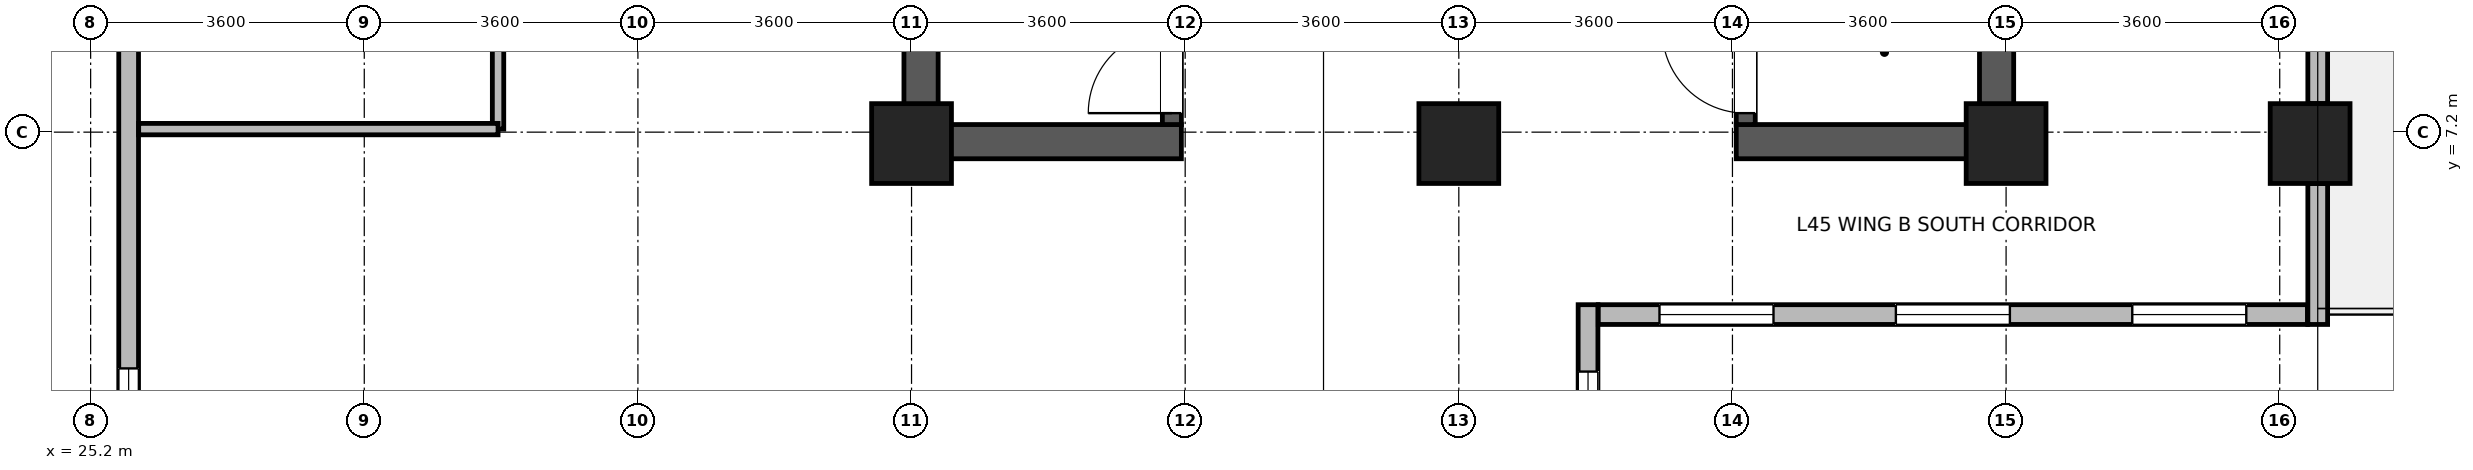
"""IFC4 building model, lengths in metres.
Left out: names, types, materials, properties, quantities, classifications, styles, units other than length and angle.
Written with IfcOpenShell. Run it as: python <this file> out.ifc"""

import sys

from ifc_helpers import new_model, si_unit, direction, frame, frame_2d, origin, origin_2d, place, context, subcontext, project, spatial, rectangle, extrude, source, transform, mapped, element, fill, save


model = new_model("IFC4")
c1 = context("Model", 3, precision=1e-05, world=origin(), true_north=direction((0.0, 1.0)))
c2 = subcontext(c1, "Body", "Model", "MODEL_VIEW")
j1 = project(units=[si_unit("LENGTHUNIT", "METRE"), si_unit("PLANEANGLEUNIT", "RADIAN")], contexts=[c1])
p1 = place(None, origin())
s1 = spatial("IfcSite", under=j1, at=p1, CompositionType="ELEMENT")
p2 = place(p1, origin())
s2 = spatial("IfcBuilding", under=s1, at=p2, CompositionType="ELEMENT")
p3 = place(p2, frame((0.0, 0.0, 177.2)))
s3 = spatial("IfcBuildingStorey", under=s2, at=p3, CompositionType="ELEMENT", Elevation=177.2)
for number, where, z_axis, x_axis in (
    (1, (36.125, 6.85, 0.0), (0.0, 0.0, 1.0), (0.0, 1.0, 0.0)),
    (2, (50.275, 6.85, 0.0), (0.0, 0.0, 1.0), (0.0, 1.0, 0.0)),
):
    element("IfcWall", number, at=place(p3, frame(where, z_axis=z_axis, x_axis=x_axis)), inside=s3, PredefinedType="SHEAR", context=c2, shape_type="SweptSolid", body=[
        extrude(rectangle(XDim=7.9, YDim=0.45, at=frame_2d((3.95, 0.0))), origin(), (0.0, 0.0, 1.0), 3.46),
    ])
for number, where, z_axis, x_axis in (
    (3, (36.35, 7.075, 0.0), (0.0, 0.0, 1.0), (1.0, 0.0, 0.0)),
    (4, (46.85, 7.075, 0.0), (0.0, 0.0, 1.0), (1.0, 0.0, 0.0)),
):
    element("IfcWall", number, at=place(p3, frame(where, z_axis=z_axis, x_axis=x_axis)), inside=s3, PredefinedType="SHEAR", context=c2, shape_type="SweptSolid", body=[
        extrude(rectangle(XDim=3.2, YDim=0.45, at=frame_2d((1.6, 0.0))), origin(), (0.0, 0.0, 1.0), 3.46),
    ])
p4 = place(p3, frame((39.425, 7.3, 0.0), z_axis=(0.0, 0.0, 1.0), x_axis=(0.0, 1.0, 0.0)))
e5 = element("IfcWall", 5, at=p4, inside=s3, PredefinedType="SHEAR", context=c2, shape_type="SweptSolid", body=[
    extrude(rectangle(XDim=7.0, YDim=0.25, at=frame_2d((3.5, 0.0))), origin(), (0.0, 0.0, 1.0), 3.46),
])
p5 = place(p4, frame((0.15, 0.0, 0.0)))
e6 = element("IfcOpeningElement", 6, at=p5, cuts=e5, PredefinedType="OPENING", context=c2, shape_type="SweptSolid", body=[
    extrude(rectangle(XDim=1.1, YDim=2.08, at=frame_2d((0.55, 1.04))), frame((0.0, 0.135, 0.0), z_axis=(0.0, -1.0, 0.0), x_axis=(1.0, 0.0, 0.0)), (0.0, 0.0, 1.0), 0.27),
])
p6 = place(p3, frame((46.975, 7.3, 0.0), z_axis=(0.0, 0.0, 1.0), x_axis=(0.0, 1.0, 0.0)))
e7 = element("IfcWall", 7, at=p6, inside=s3, PredefinedType="SHEAR", context=c2, shape_type="SweptSolid", body=[
    extrude(rectangle(XDim=7.0, YDim=0.25, at=frame_2d((3.5, 0.0))), origin(), (0.0, 0.0, 1.0), 3.46),
])
p7 = place(p6, frame((0.15, 0.0, 0.0)))
e8 = element("IfcOpeningElement", 8, at=p7, cuts=e7, PredefinedType="OPENING", context=c2, shape_type="SweptSolid", body=[
    extrude(rectangle(XDim=1.1, YDim=2.08, at=frame_2d((0.55, 1.04))), frame((0.0, 0.135, 0.0), z_axis=(0.0, -1.0, 0.0), x_axis=(1.0, 0.0, 0.0)), (0.0, 0.0, 1.0), 0.27),
])
m1 = source(origin(), c2, "Body", "SweptSolid", [
    extrude(rectangle(XDim=1.05, YDim=1.05, at=origin_2d()), origin(), (0.0, 0.0, 1.0), 3.7),
])
for number, where, z_axis, x_axis in (
    (9, (36.0, 7.05, 0.0), (0.0, 0.0, 1.0), (1.0, 0.0, 0.0)),
    (10, (43.2, 7.05, 0.0), (0.0, 0.0, 1.0), (1.0, 0.0, 0.0)),
    (11, (50.4, 7.05, 0.0), (0.0, 0.0, 1.0), (1.0, 0.0, 0.0)),
    (12, (54.4, 7.05, 0.0), (0.0, 0.0, 1.0), (1.0, 0.0, 0.0)),
):
    element("IfcColumn", number, at=place(p3, frame(where, z_axis=z_axis, x_axis=x_axis)), inside=s3, PredefinedType="COLUMN", context=c2, shape_type="MappedRepresentation", body=[
        mapped(m1, transform((0.0, 0.0, 0.0), x_axis=(1.0, 0.0, 0.0), y_axis=(0.0, 1.0, 0.0), z_axis=(0.0, 0.0, 1.0), scale=1.0)),
    ])
p8 = place(p3, frame((44.9, 4.93, 0.0), z_axis=(0.0, 0.0, 1.0), x_axis=(0.0, -1.0, 0.0)))
e13 = element("IfcWall", 13, at=p8, inside=s3, PredefinedType="STANDARD", context=c2, shape_type="SweptSolid", body=[
    extrude(rectangle(XDim=3.26, YDim=0.26, at=frame_2d((1.63, 0.0))), origin(), (0.0, 0.0, 1.0), 3.44),
])
p9 = place(p8, frame((0.88, 0.0, 0.85)))
e14 = element("IfcOpeningElement", 14, at=p9, cuts=e13, PredefinedType="OPENING", context=c2, shape_type="SweptSolid", body=[
    extrude(rectangle(XDim=1.5, YDim=1.85, at=frame_2d((0.75, 0.925))), frame((0.0, 0.14, 0.0), z_axis=(0.0, -1.0, 0.0), x_axis=(1.0, 0.0, 0.0)), (0.0, 0.0, 1.0), 0.28),
])
p10 = place(p3, frame((54.365, 4.8, 0.0), z_axis=(0.0, 0.0, 1.0), x_axis=(-1.0, 0.0, 0.0)))
e15 = element("IfcWall", 15, at=p10, inside=s3, PredefinedType="STANDARD", context=c2, shape_type="SweptSolid", body=[
    extrude(rectangle(XDim=9.33, YDim=0.26, at=frame_2d((4.665, 0.0))), origin(), (0.0, 0.0, 1.0), 3.44),
])
p11 = place(p10, frame((0.805, 0.0, 0.85)))
e16 = element("IfcOpeningElement", 16, at=p11, cuts=e15, PredefinedType="OPENING", context=c2, shape_type="SweptSolid", body=[
    extrude(rectangle(XDim=1.5, YDim=1.85, at=frame_2d((0.75, 0.925))), frame((0.0, 0.14, 0.0), z_axis=(0.0, -1.0, 0.0), x_axis=(1.0, 0.0, 0.0)), (0.0, 0.0, 1.0), 0.28),
])
p12 = place(p10, frame((3.915, 0.0, 0.85)))
e17 = element("IfcOpeningElement", 17, at=p12, cuts=e15, PredefinedType="OPENING", context=c2, shape_type="SweptSolid", body=[
    extrude(rectangle(XDim=1.5, YDim=1.85, at=frame_2d((0.75, 0.925))), frame((0.0, 0.14, 0.0), z_axis=(0.0, -1.0, 0.0), x_axis=(1.0, 0.0, 0.0)), (0.0, 0.0, 1.0), 0.28),
])
p13 = place(p10, frame((7.025, 0.0, 0.85)))
e18 = element("IfcOpeningElement", 18, at=p13, cuts=e15, PredefinedType="OPENING", context=c2, shape_type="SweptSolid", body=[
    extrude(rectangle(XDim=1.5, YDim=1.85, at=frame_2d((0.75, 0.925))), frame((0.0, 0.14, 0.0), z_axis=(0.0, -1.0, 0.0), x_axis=(1.0, 0.0, 0.0)), (0.0, 0.0, 1.0), 0.28),
])
p14 = place(p3, frame((54.5, 6.524, 0.0), z_axis=(0.0, 0.0, 1.0), x_axis=(0.0, -1.0, 0.0)))
e19 = element("IfcWall", 19, at=p14, inside=s3, PredefinedType="STANDARD", context=c2, shape_type="SweptSolid", body=[
    extrude(rectangle(XDim=1.854, YDim=0.26, at=frame_2d((0.927, 0.0))), origin(), (0.0, 0.0, 1.0), 3.44),
])
p15 = place(p3, frame((54.5, 14.024, 0.0), z_axis=(0.0, 0.0, 1.0), x_axis=(0.0, -1.0, 0.0)))
e20 = element("IfcWall", 20, at=p15, inside=s3, PredefinedType="STANDARD", context=c2, shape_type="SweptSolid", body=[
    extrude(rectangle(XDim=6.448, YDim=0.26, at=frame_2d((3.224, 0.0))), origin(), (0.0, 0.0, 1.0), 2.99),
])
p16 = place(p15, frame((4.086, 0.0, 0.85)))
e21 = element("IfcOpeningElement", 21, at=p16, cuts=e20, PredefinedType="OPENING", context=c2, shape_type="SweptSolid", body=[
    extrude(rectangle(XDim=1.5, YDim=1.85, at=frame_2d((0.75, 0.925))), frame((0.0, 0.14, 0.0), z_axis=(0.0, -1.0, 0.0), x_axis=(1.0, 0.0, 0.0)), (0.0, 0.0, 1.0), 0.28),
])
p17 = place(p15, frame((2.749, 0.0, 0.85)))
e22 = element("IfcOpeningElement", 22, at=p17, cuts=e20, PredefinedType="OPENING", context=c2, shape_type="SweptSolid", body=[
    extrude(rectangle(XDim=0.95, YDim=1.75, at=frame_2d((0.475, 0.875))), frame((0.0, 0.14, 0.0), z_axis=(0.0, -1.0, 0.0), x_axis=(1.0, 0.0, 0.0)), (0.0, 0.0, 1.0), 0.28),
])
p18 = place(p3, frame((25.7, 1.67, 0.0), z_axis=(0.0, 0.0, 1.0), x_axis=(0.0, 1.0, 0.0)))
e23 = element("IfcWall", 23, at=p18, inside=s3, PredefinedType="STANDARD", context=c2, shape_type="SweptSolid", body=[
    extrude(rectangle(XDim=20.06, YDim=0.26, at=frame_2d((10.03, 0.0))), origin(), (0.0, 0.0, 1.0), 3.44),
])
p19 = place(p18, frame((0.922, 0.0, 0.85)))
e24 = element("IfcOpeningElement", 24, at=p19, cuts=e23, PredefinedType="OPENING", context=c2, shape_type="SweptSolid", body=[
    extrude(rectangle(XDim=1.5, YDim=1.85, at=frame_2d((0.75, 0.925))), frame((0.0, 0.14, 0.0), z_axis=(0.0, -1.0, 0.0), x_axis=(1.0, 0.0, 0.0)), (0.0, 0.0, 1.0), 0.28),
])
p20 = place(p18, frame((7.608, 0.0, 0.85)))
e25 = element("IfcOpeningElement", 25, at=p20, cuts=e23, PredefinedType="OPENING", context=c2, shape_type="SweptSolid", body=[
    extrude(rectangle(XDim=1.5, YDim=1.85, at=frame_2d((0.75, 0.925))), frame((0.0, 0.14, 0.0), z_axis=(0.0, -1.0, 0.0), x_axis=(1.0, 0.0, 0.0)), (0.0, 0.0, 1.0), 0.28),
])
p21 = place(p18, frame((10.952, 0.0, 0.85)))
e26 = element("IfcOpeningElement", 26, at=p21, cuts=e23, PredefinedType="OPENING", context=c2, shape_type="SweptSolid", body=[
    extrude(rectangle(XDim=1.5, YDim=1.85, at=frame_2d((0.75, 0.925))), frame((0.0, 0.14, 0.0), z_axis=(0.0, -1.0, 0.0), x_axis=(1.0, 0.0, 0.0)), (0.0, 0.0, 1.0), 0.28),
])
p22 = place(p18, frame((14.295, 0.0, 0.85)))
e27 = element("IfcOpeningElement", 27, at=p22, cuts=e23, PredefinedType="OPENING", context=c2, shape_type="SweptSolid", body=[
    extrude(rectangle(XDim=1.5, YDim=1.85, at=frame_2d((0.75, 0.925))), frame((0.0, 0.14, 0.0), z_axis=(0.0, -1.0, 0.0), x_axis=(1.0, 0.0, 0.0)), (0.0, 0.0, 1.0), 0.28),
])
p23 = place(p18, frame((17.638, 0.0, 0.85)))
e28 = element("IfcOpeningElement", 28, at=p23, cuts=e23, PredefinedType="OPENING", context=c2, shape_type="SweptSolid", body=[
    extrude(rectangle(XDim=1.5, YDim=1.85, at=frame_2d((0.75, 0.925))), frame((0.0, 0.14, 0.0), z_axis=(0.0, -1.0, 0.0), x_axis=(1.0, 0.0, 0.0)), (0.0, 0.0, 1.0), 0.28),
])
p24 = place(p3, frame((30.56, 7.24, 0.0), z_axis=(0.0, 0.0, 1.0), x_axis=(0.0, 1.0, 0.0)))
e29 = element("IfcWall", 29, at=p24, inside=s3, PredefinedType="PARTITIONING", context=c2, shape_type="SweptSolid", body=[
    extrude(rectangle(XDim=7.26, YDim=0.15, at=frame_2d((3.63, 0.0))), origin(), (0.0, 0.0, 1.0), 3.44),
])
p25 = place(p24, frame((2.98, 0.0, 0.0)))
e30 = element("IfcOpeningElement", 30, at=p25, cuts=e29, PredefinedType="OPENING", context=c2, shape_type="SweptSolid", body=[
    extrude(rectangle(XDim=1.3, YDim=2.12, at=frame_2d((0.65, 1.06))), frame((0.0, 0.085, 0.0), z_axis=(0.0, -1.0, 0.0), x_axis=(1.0, 0.0, 0.0)), (0.0, 0.0, 1.0), 0.17),
])
p26 = place(p3, frame((25.832, 7.24, 0.0), z_axis=(0.0, 0.0, 1.0), x_axis=(1.0, 0.0, 0.0)))
e31 = element("IfcWall", 31, at=p26, inside=s3, PredefinedType="PARTITIONING", context=c2, shape_type="SweptSolid", body=[
    extrude(rectangle(XDim=4.728, YDim=0.15, at=frame_2d((2.364, 0.0))), origin(), (0.0, 0.0, 1.0), 3.44),
])
p27 = place(p9, origin())
e32 = element("IfcWindow", 32, at=p27, inside=s3, PartitioningType="SINGLE_PANEL", PredefinedType="WINDOW", context=c2, shape_type="SweptSolid", body=[
    extrude(rectangle(XDim=1.5, YDim=1.85, at=frame_2d((0.75, 0.925))), frame((0.0, 0.03, 0.0), z_axis=(0.0, -1.0, 0.0), x_axis=(1.0, 0.0, 0.0)), (0.0, 0.0, 1.0), 0.06),
])
fill(e14, e32)
p28 = place(p11, origin())
e33 = element("IfcWindow", 33, at=p28, inside=s3, PartitioningType="SINGLE_PANEL", PredefinedType="WINDOW", context=c2, shape_type="SweptSolid", body=[
    extrude(rectangle(XDim=1.5, YDim=1.85, at=frame_2d((0.75, 0.925))), frame((0.0, 0.03, 0.0), z_axis=(0.0, -1.0, 0.0), x_axis=(1.0, 0.0, 0.0)), (0.0, 0.0, 1.0), 0.06),
])
fill(e16, e33)
p29 = place(p12, origin())
e34 = element("IfcWindow", 34, at=p29, inside=s3, PartitioningType="SINGLE_PANEL", PredefinedType="WINDOW", context=c2, shape_type="SweptSolid", body=[
    extrude(rectangle(XDim=1.5, YDim=1.85, at=frame_2d((0.75, 0.925))), frame((0.0, 0.03, 0.0), z_axis=(0.0, -1.0, 0.0), x_axis=(1.0, 0.0, 0.0)), (0.0, 0.0, 1.0), 0.06),
])
fill(e17, e34)
p30 = place(p13, origin())
e35 = element("IfcWindow", 35, at=p30, inside=s3, PartitioningType="SINGLE_PANEL", PredefinedType="WINDOW", context=c2, shape_type="SweptSolid", body=[
    extrude(rectangle(XDim=1.5, YDim=1.85, at=frame_2d((0.75, 0.925))), frame((0.0, 0.03, 0.0), z_axis=(0.0, -1.0, 0.0), x_axis=(1.0, 0.0, 0.0)), (0.0, 0.0, 1.0), 0.06),
])
fill(e18, e35)
p31 = place(p19, origin())
e36 = element("IfcWindow", 36, at=p31, inside=s3, PartitioningType="SINGLE_PANEL", PredefinedType="WINDOW", context=c2, shape_type="SweptSolid", body=[
    extrude(rectangle(XDim=1.5, YDim=1.85, at=frame_2d((0.75, 0.925))), frame((0.0, 0.03, 0.0), z_axis=(0.0, -1.0, 0.0), x_axis=(1.0, 0.0, 0.0)), (0.0, 0.0, 1.0), 0.06),
])
fill(e24, e36)
p32 = place(p5, origin())
e37 = element("IfcDoor", 37, at=p32, inside=s3, OperationType="SINGLE_SWING_LEFT", PredefinedType="DOOR", context=c2, shape_type="SweptSolid", body=[
    extrude(rectangle(XDim=1.1, YDim=2.08, at=frame_2d((0.55, 1.04))), frame((0.0, 0.025, 0.0), z_axis=(0.0, -1.0, 0.0), x_axis=(1.0, 0.0, 0.0)), (0.0, 0.0, 1.0), 0.05),
])
fill(e6, e37)
p33 = place(p7, origin())
e38 = element("IfcDoor", 38, at=p33, inside=s3, OperationType="SINGLE_SWING_RIGHT", PredefinedType="DOOR", context=c2, shape_type="SweptSolid", body=[
    extrude(rectangle(XDim=1.1, YDim=2.08, at=frame_2d((0.55, 1.04))), frame((0.0, 0.025, 0.0), z_axis=(0.0, -1.0, 0.0), x_axis=(1.0, 0.0, 0.0)), (0.0, 0.0, 1.0), 0.05),
])
fill(e8, e38)
save(model, sys.argv[1])
